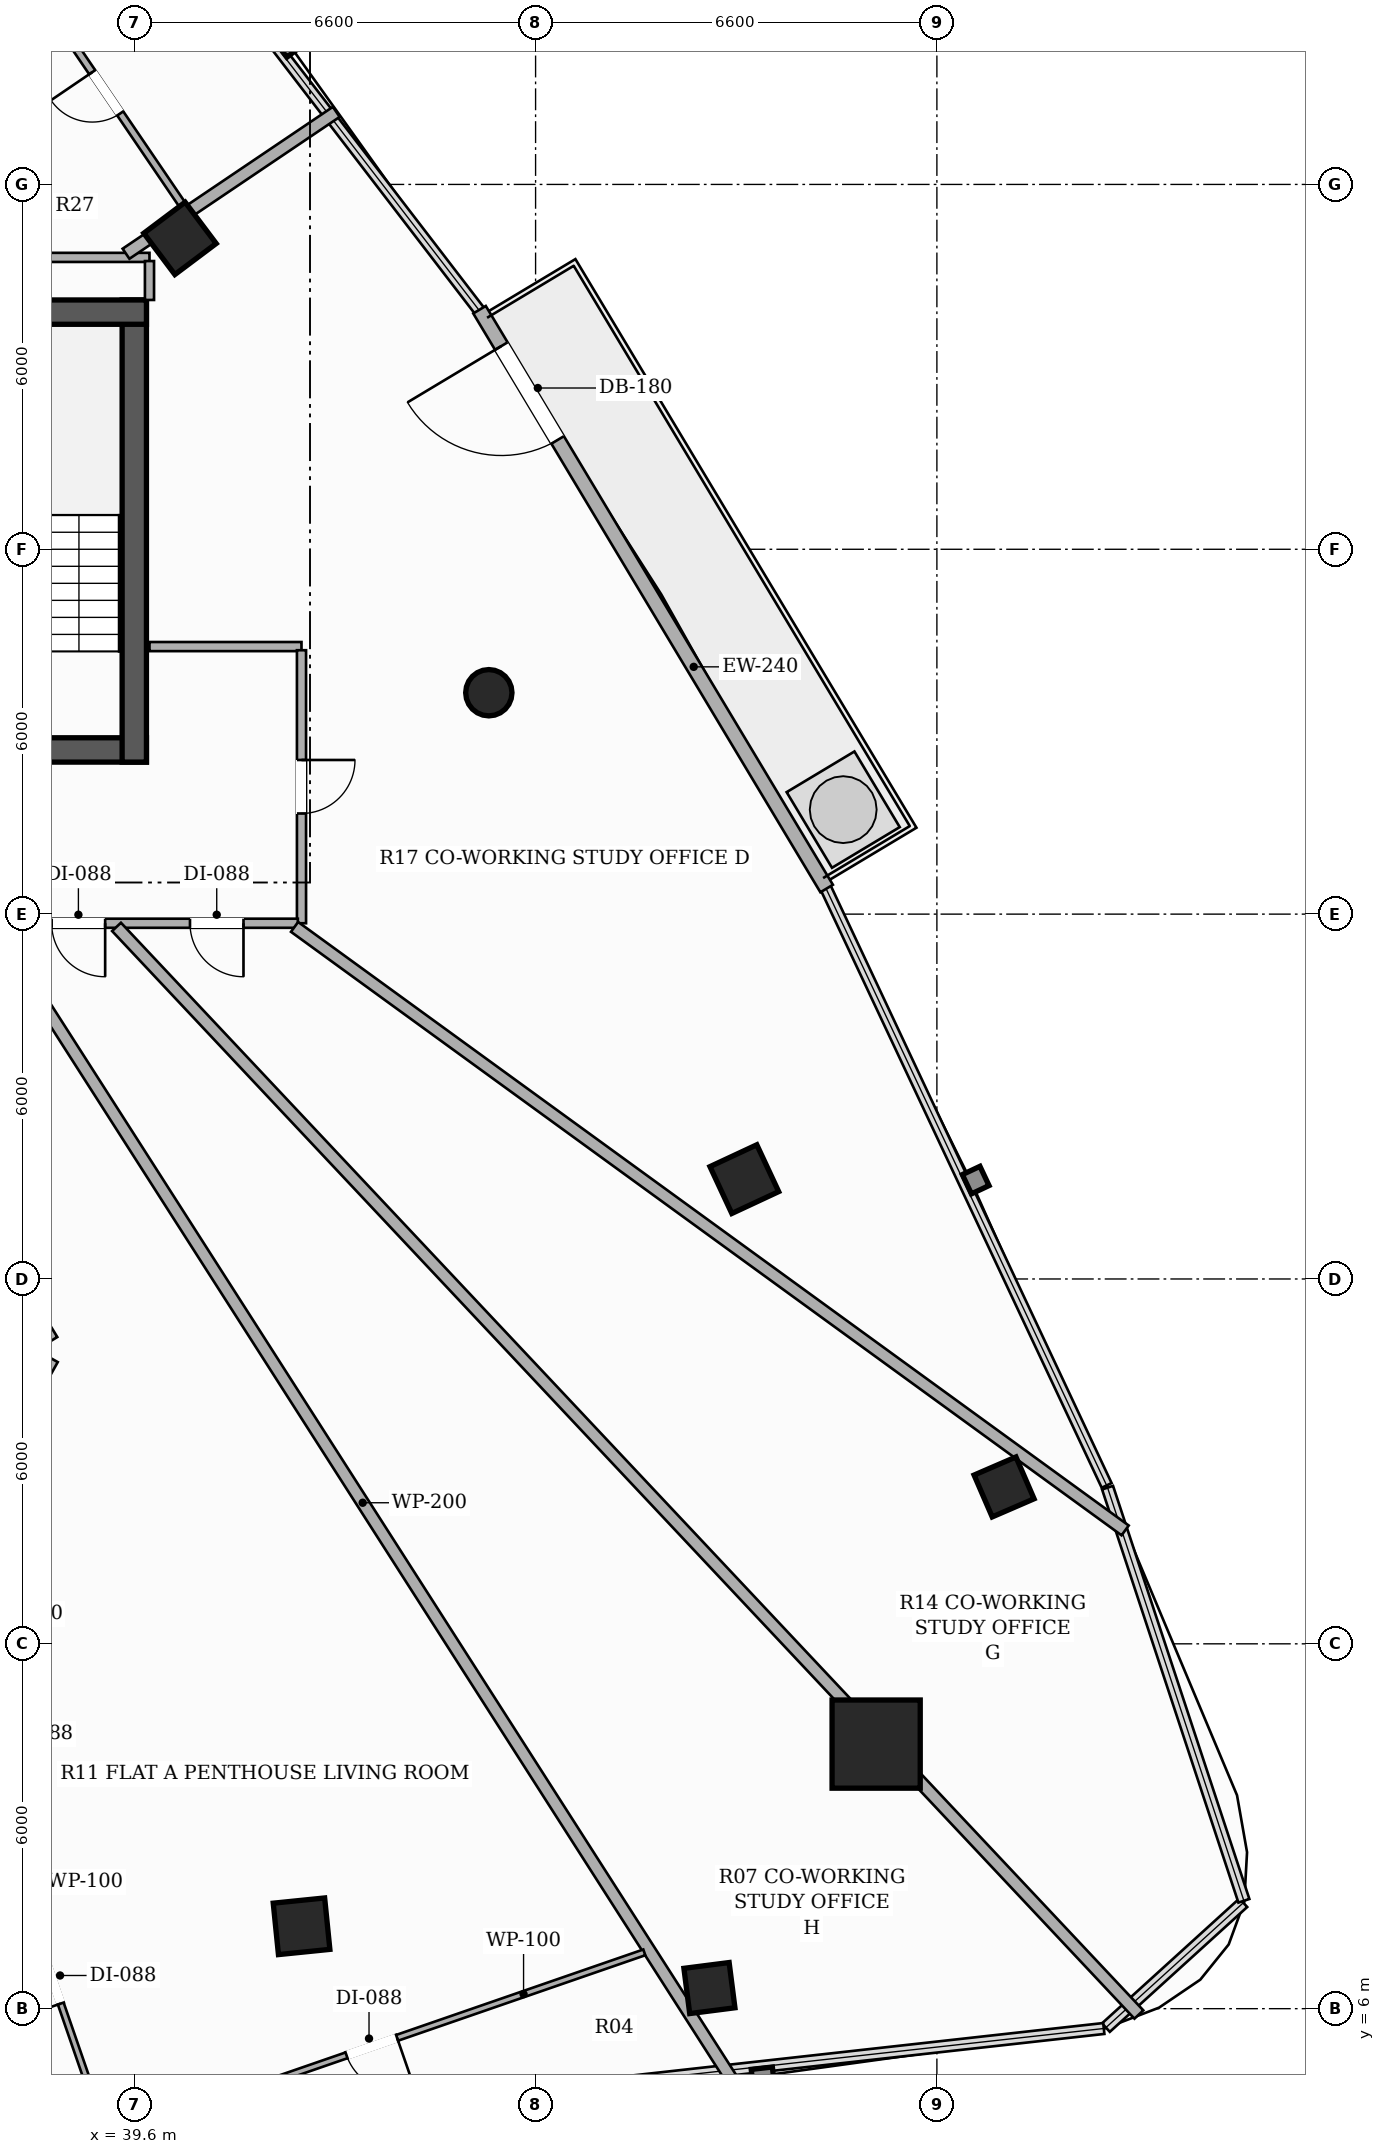
"""IFC4 building model, lengths in metres.
Left out: names, types, materials, properties, quantities, classifications, styles, units other than length and angle.
Written with IfcOpenShell. Run it as: python <this file> out.ifc"""

import sys

from ifc_helpers import new_model, si_unit, direction, frame, frame_2d, origin, origin_2d, place, context, subcontext, project, spatial, rectangle, hollow_rectangle, hollow_circle, extrude, element, fill, save


model = new_model("IFC4")
c1 = context("Model", 3, precision=1e-05, world=origin(), true_north=direction((0.0, 1.0)))
c2 = subcontext(c1, "Body", "Model", "MODEL_VIEW")
j1 = project(units=[si_unit("LENGTHUNIT", "METRE"), si_unit("PLANEANGLEUNIT", "RADIAN")], contexts=[c1])
p1 = place(None, origin())
s1 = spatial("IfcSite", under=j1, at=p1, CompositionType="ELEMENT")
p2 = place(p1, origin())
s2 = spatial("IfcBuilding", under=s1, at=p2, CompositionType="ELEMENT")
p3 = place(p2, frame((0.0, 0.0, 160.55)))
s3 = spatial("IfcBuildingStorey", under=s2, at=p3, CompositionType="ELEMENT", Elevation=160.55)
p4 = place(p3, frame((26.2, 26.7, 0.0), z_axis=(0.0, 0.0, 1.0), x_axis=(1.0, 0.0, 0.0)))
e1 = element("IfcWall", 1, at=p4, inside=s3, PredefinedType="SHEAR", context=c2, shape_type="SweptSolid", body=[
    extrude(rectangle(XDim=13.6, YDim=0.4, at=frame_2d((6.8, 0.0))), origin(), (0.0, 0.0, 1.0), 3.3),
])
p5 = place(p4, frame((4.35, 0.0, 0.0)))
e2 = element("IfcOpeningElement", 2, at=p5, cuts=e1, PredefinedType="OPENING", context=c2, shape_type="SweptSolid", body=[
    extrude(rectangle(XDim=1.05, YDim=2.15, at=frame_2d((0.525, 1.075))), frame((0.0, 0.21, 0.0), z_axis=(0.0, -1.0, 0.0), x_axis=(1.0, 0.0, 0.0)), (0.0, 0.0, 1.0), 0.42),
])
p6 = place(p4, frame((8.3, 0.0, 0.0)))
e3 = element("IfcOpeningElement", 3, at=p6, cuts=e1, PredefinedType="OPENING", context=c2, shape_type="SweptSolid", body=[
    extrude(rectangle(XDim=1.05, YDim=2.15, at=frame_2d((0.525, 1.075))), frame((0.0, 0.21, 0.0), z_axis=(0.0, -1.0, 0.0), x_axis=(1.0, 0.0, 0.0)), (0.0, 0.0, 1.0), 0.42),
])
p7 = place(p3, frame((39.6, 26.5, 0.0), z_axis=(0.0, 0.0, 1.0), x_axis=(0.0, 1.0, 0.0)))
e4 = element("IfcWall", 4, at=p7, inside=s3, PredefinedType="SHEAR", context=c2, shape_type="SweptSolid", body=[
    extrude(rectangle(XDim=7.6, YDim=0.4, at=frame_2d((3.8, 0.0))), origin(), (0.0, 0.0, 1.0), 3.3),
])
p8 = place(p3, frame((36.12, 33.9, 0.0), z_axis=(0.0, 0.0, 1.0), x_axis=(1.0, 0.0, 0.0)))
e5 = element("IfcWall", 5, at=p8, inside=s3, PredefinedType="SHEAR", context=c2, shape_type="SweptSolid", body=[
    extrude(rectangle(XDim=3.68, YDim=0.4, at=frame_2d((1.84, 0.0))), origin(), (0.0, 0.0, 1.0), 3.3),
])
p9 = place(p3, frame((51.801, 10.351, 0.0), z_axis=(0.0, 0.0, 1.0), x_axis=(1.0, 0.0, 0.0)))
e6 = element("IfcColumn", 6, at=p9, inside=s3, PredefinedType="COLUMN", context=c2, shape_type="SweptSolid", body=[
    extrude(hollow_rectangle(XDim=1.45, YDim=1.45, WallThickness=0.045, at=origin_2d()), origin(), (0.0, 0.0, 1.0), 3.3),
])
for number, where, z_axis, x_axis in (
    (7, (42.351, 7.355, 0.0), (0.0, 0.0, 1.0), (0.995, 0.101, 0.0)),
    (8, (49.633, 19.642, 0.0), (0.0, 0.0, 1.0), (-0.423, 0.906, 0.0)),
):
    element("IfcColumn", number, at=place(p3, frame(where, z_axis=z_axis, x_axis=x_axis)), inside=s3, PredefinedType="COLUMN", context=c2, shape_type="SweptSolid", body=[
        extrude(hollow_rectangle(XDim=0.85, YDim=0.85, WallThickness=0.028, at=origin_2d()), origin(), (0.0, 0.0, 1.0), 3.3),
    ])
p10 = place(p3, frame((45.431, 27.641, 0.0), z_axis=(0.0, 0.0, 1.0), x_axis=(1.0, 0.0, 0.0)))
e9 = element("IfcColumn", 9, at=p10, inside=s3, PredefinedType="COLUMN", context=c2, shape_type="SweptSolid", body=[
    extrude(hollow_circle(Radius=0.381, WallThickness=0.022, at=origin_2d()), origin(), (0.0, 0.0, 1.0), 3.3),
])
p11 = place(p3, frame((40.352, 35.113, 0.0), z_axis=(0.0, 0.0, 1.0), x_axis=(-0.600420225326, 0.799684658487, 0.0)))
e10 = element("IfcColumn", 10, at=p11, inside=s3, PredefinedType="COLUMN", context=c2, shape_type="SweptSolid", body=[
    extrude(hollow_rectangle(XDim=0.85, YDim=0.85, WallThickness=0.028, at=origin_2d()), origin(), (0.0, 0.0, 1.0), 3.3),
])
for number, where, z_axis, x_axis in (
    (11, (49.059, 6.339, 0.0), (0.0, 0.0, 1.0), (0.992, 0.127, 0.0)),
    (12, (53.905, 14.58, 0.0), (0.0, 0.0, 1.0), (-0.397, 0.918, 0.0)),
):
    element("IfcColumn", number, at=place(p3, frame(where, z_axis=z_axis, x_axis=x_axis)), inside=s3, PredefinedType="COLUMN", context=c2, shape_type="SweptSolid", body=[
        extrude(hollow_rectangle(XDim=0.75, YDim=0.75, WallThickness=0.025, at=origin_2d()), origin(), (0.0, 0.0, 1.0), 3.3),
    ])
p12 = place(p3, frame((50.987, 24.421, 0.0), z_axis=(0.0, 0.0, 1.0), x_axis=(-0.514334017412, 0.85758994778, 0.0)))
e13 = element("IfcWall", 13, at=p12, inside=s3, PredefinedType="SOLIDWALL", context=c2, shape_type="SweptSolid", body=[
    extrude(rectangle(XDim=11.1, YDim=0.24, at=frame_2d((5.55, 0.0))), origin(), (0.0, 0.0, 1.0), 2.624),
])
p13 = place(p12, frame((8.602, 0.0, 0.0)))
e14 = element("IfcOpeningElement", 14, at=p13, cuts=e13, PredefinedType="OPENING", context=c2, shape_type="SweptSolid", body=[
    extrude(rectangle(XDim=1.8, YDim=2.2, at=frame_2d((0.9, 1.1))), frame((0.0, 0.13, 0.0), z_axis=(0.0, -1.0, 0.0), x_axis=(1.0, 0.0, 0.0)), (0.0, 0.0, 1.0), 0.26),
])
p14 = place(p3, frame((39.85, 28.4, 0.0), z_axis=(0.0, 0.0, 1.0), x_axis=(1.0, 0.0, 0.0)))
e15 = element("IfcWall", 15, at=p14, inside=s3, PredefinedType="PARTITIONING", context=c2, shape_type="SweptSolid", body=[
    extrude(rectangle(XDim=2.5, YDim=0.15, at=frame_2d((1.25, 0.0))), origin(), (0.0, 0.0, 1.0), 2.721),
])
p15 = place(p3, frame((42.35, 28.34, 0.0), z_axis=(0.0, 0.0, 1.0), x_axis=(0.0, -1.0, 0.0)))
e16 = element("IfcWall", 16, at=p15, inside=s3, PredefinedType="PARTITIONING", context=c2, shape_type="SweptSolid", body=[
    extrude(rectangle(XDim=4.49, YDim=0.15, at=frame_2d((2.245, 0.0))), origin(), (0.0, 0.0, 1.0), 2.721),
])
p16 = place(p15, frame((1.805, 0.0, 0.0)))
e17 = element("IfcOpeningElement", 17, at=p16, cuts=e16, PredefinedType="OPENING", context=c2, shape_type="SweptSolid", body=[
    extrude(rectangle(XDim=0.88, YDim=2.1, at=frame_2d((0.44, 1.05))), frame((0.0, 0.085, 0.0), z_axis=(0.0, -1.0, 0.0), x_axis=(1.0, 0.0, 0.0)), (0.0, 0.0, 1.0), 0.17),
])
p17 = place(p3, frame((42.29, 23.85, 0.0), z_axis=(0.0, 0.0, 1.0), x_axis=(-1.0, 0.0, 0.0)))
e18 = element("IfcWall", 18, at=p17, inside=s3, PredefinedType="PARTITIONING", context=c2, shape_type="SweptSolid", body=[
    extrude(rectangle(XDim=8.202, YDim=0.15, at=frame_2d((4.101, 0.0))), origin(), (0.0, 0.0, 1.0), 2.492),
])
p18 = place(p17, frame((5.987, 0.0, 0.0)))
e19 = element("IfcOpeningElement", 19, at=p18, cuts=e18, PredefinedType="OPENING", context=c2, shape_type="SweptSolid", body=[
    extrude(rectangle(XDim=0.92, YDim=2.15, at=frame_2d((0.46, 1.075))), frame((0.0, 0.085, 0.0), z_axis=(0.0, -1.0, 0.0), x_axis=(1.0, 0.0, 0.0)), (0.0, 0.0, 1.0), 0.17),
])
p19 = place(p17, frame((0.894, 0.0, 0.0)))
e20 = element("IfcOpeningElement", 20, at=p19, cuts=e18, PredefinedType="OPENING", context=c2, shape_type="SweptSolid", body=[
    extrude(rectangle(XDim=0.88, YDim=2.1, at=frame_2d((0.44, 1.05))), frame((0.0, 0.085, 0.0), z_axis=(0.0, -1.0, 0.0), x_axis=(1.0, 0.0, 0.0)), (0.0, 0.0, 1.0), 0.17),
])
p20 = place(p17, frame((3.169, 0.0, 0.0)))
e21 = element("IfcOpeningElement", 21, at=p20, cuts=e18, PredefinedType="OPENING", context=c2, shape_type="SweptSolid", body=[
    extrude(rectangle(XDim=0.88, YDim=2.1, at=frame_2d((0.44, 1.05))), frame((0.0, 0.085, 0.0), z_axis=(0.0, -1.0, 0.0), x_axis=(1.0, 0.0, 0.0)), (0.0, 0.0, 1.0), 0.17),
])
p21 = place(p3, frame((37.91, 34.8, 0.0), z_axis=(0.0, 0.0, 1.0), x_axis=(1.0, 0.0, 0.0)))
e22 = element("IfcWall", 22, at=p21, inside=s3, PredefinedType="PARTITIONING", context=c2, shape_type="SweptSolid", body=[
    extrude(rectangle(XDim=1.94, YDim=0.15, at=frame_2d((0.97, 0.0))), origin(), (0.0, 0.0, 1.0), 2.721),
])
p22 = place(p3, frame((39.85, 34.74, 0.0), z_axis=(0.0, 0.0, 1.0), x_axis=(0.0, -1.0, 0.0)))
e23 = element("IfcWall", 23, at=p22, inside=s3, PredefinedType="PARTITIONING", context=c2, shape_type="SweptSolid", body=[
    extrude(rectangle(XDim=0.64, YDim=0.15, at=frame_2d((0.32, 0.0))), origin(), (0.0, 0.0, 1.0), 2.721),
])
p23 = place(p3, frame((34.119, 23.79, 0.0), z_axis=(0.0, 0.0, 1.0), x_axis=(0.521942869651, -0.852980445744, 0.0)))
e24 = element("IfcWall", 24, at=p23, inside=s3, PredefinedType="PARTITIONING", context=c2, shape_type="SweptSolid", body=[
    extrude(rectangle(XDim=7.953, YDim=0.15, at=frame_2d((3.977, 0.0))), origin(), (0.0, 0.0, 1.0), 2.721),
])
p24 = place(p3, frame((38.276, 16.67, 0.0), z_axis=(0.0, 0.0, 1.0), x_axis=(-0.489067077696, -0.872246177127, 0.0)))
e25 = element("IfcWall", 25, at=p24, inside=s3, PredefinedType="PARTITIONING", context=c2, shape_type="SweptSolid", body=[
    extrude(rectangle(XDim=1.01, YDim=0.15, at=frame_2d((0.505, 0.0))), origin(), (0.0, 0.0, 1.0), 3.06),
])
p25 = place(p3, frame((37.295, 23.79, 0.0), z_axis=(0.0, 0.0, 1.0), x_axis=(0.539100523601, -0.842241429433, 0.0)))
e26 = element("IfcWall", 26, at=p25, inside=s3, PredefinedType="PARTITIONING", context=c2, shape_type="SweptSolid", body=[
    extrude(rectangle(XDim=22.488, YDim=0.2, at=frame_2d((11.244, 0.0))), origin(), (0.0, 0.0, 1.0), 2.413),
])
p26 = place(p3, frame((39.464, 34.86, 0.0), z_axis=(0.0, 0.0, 1.0), x_axis=(0.828976210701, 0.559283865395, 0.0)))
e27 = element("IfcWall", 27, at=p26, inside=s3, PredefinedType="PARTITIONING", context=c2, shape_type="SweptSolid", body=[
    extrude(rectangle(XDim=4.171, YDim=0.2, at=frame_2d((2.086, 0.0))), origin(), (0.0, 0.0, 1.0), 2.413),
])
p27 = place(p3, frame((55.896, 13.865, 0.0), z_axis=(0.0, 0.0, 1.0), x_axis=(-0.809001736781, 0.587806251995, 0.0)))
e28 = element("IfcWall", 28, at=p27, inside=s3, PredefinedType="PARTITIONING", context=c2, shape_type="SweptSolid", body=[
    extrude(rectangle(XDim=16.885, YDim=0.2, at=frame_2d((8.442, 0.0))), origin(), (0.0, 0.0, 1.0), 2.413),
])
p28 = place(p3, frame((56.122, 5.904, 0.0), z_axis=(0.0, 0.0, 1.0), x_axis=(-0.684934612975, 0.728604540165, 0.0)))
e29 = element("IfcWall", 29, at=p28, inside=s3, PredefinedType="PARTITIONING", context=c2, shape_type="SweptSolid", body=[
    extrude(rectangle(XDim=24.548, YDim=0.2, at=frame_2d((12.274, 0.0))), origin(), (0.0, 0.0, 1.0), 2.413),
])
p29 = place(p3, frame((39.164, 3.848, 0.0), z_axis=(0.0, 0.0, 1.0), x_axis=(-0.326778856457, 0.945100830056, 0.0)))
e30 = element("IfcWall", 30, at=p29, inside=s3, PredefinedType="PARTITIONING", context=c2, shape_type="SweptSolid", body=[
    extrude(rectangle(XDim=5.612, YDim=0.1, at=frame_2d((2.806, 0.0))), origin(), (0.0, 0.0, 1.0), 2.413),
])
p30 = place(p29, frame((2.366, 0.0, 0.0)))
e31 = element("IfcOpeningElement", 31, at=p30, cuts=e30, PredefinedType="OPENING", context=c2, shape_type="SweptSolid", body=[
    extrude(rectangle(XDim=0.88, YDim=2.1, at=frame_2d((0.44, 1.05))), frame((0.0, 0.06, 0.0), z_axis=(0.0, -1.0, 0.0), x_axis=(1.0, 0.0, 0.0)), (0.0, 0.0, 1.0), 0.12),
])
p31 = place(p3, frame((47.988, 6.926, 0.0), z_axis=(0.0, 0.0, 1.0), x_axis=(-0.945100175753, -0.326780748809, 0.0)))
e32 = element("IfcWall", 32, at=p31, inside=s3, PredefinedType="PARTITIONING", context=c2, shape_type="SweptSolid", body=[
    extrude(rectangle(XDim=9.484, YDim=0.1, at=frame_2d((4.742, 0.0))), origin(), (0.0, 0.0, 1.0), 2.413),
])
p32 = place(p31, frame((4.302, 0.0, 0.0)))
e33 = element("IfcOpeningElement", 33, at=p32, cuts=e32, PredefinedType="OPENING", context=c2, shape_type="SweptSolid", body=[
    extrude(rectangle(XDim=0.88, YDim=2.1, at=frame_2d((0.44, 1.05))), frame((0.0, 0.06, 0.0), z_axis=(0.0, -1.0, 0.0), x_axis=(1.0, 0.0, 0.0)), (0.0, 0.0, 1.0), 0.12),
])
p33 = place(p3, frame((40.427, 35.612, 0.0), z_axis=(0.0, 0.0, 1.0), x_axis=(-0.562385802303, 0.826874965982, 0.0)))
e34 = element("IfcWall", 34, at=p33, inside=s3, PredefinedType="PARTITIONING", context=c2, shape_type="SweptSolid", body=[
    extrude(rectangle(XDim=4.582, YDim=0.12, at=frame_2d((2.291, 0.0))), origin(), (0.0, 0.0, 1.0), 2.413),
])
p34 = place(p33, frame((1.881, 0.0, 0.0)))
e35 = element("IfcOpeningElement", 35, at=p34, cuts=e34, PredefinedType="OPENING", context=c2, shape_type="SweptSolid", body=[
    extrude(rectangle(XDim=0.82, YDim=2.1, at=frame_2d((0.41, 1.05))), frame((0.0, 0.07, 0.0), z_axis=(0.0, -1.0, 0.0), x_axis=(1.0, 0.0, 0.0)), (0.0, 0.0, 1.0), 0.14),
])
p35 = place(p13, origin())
e36 = element("IfcDoor", 36, at=p35, inside=s3, OperationType="SINGLE_SWING_RIGHT", PredefinedType="DOOR", context=c2, shape_type="SweptSolid", body=[
    extrude(rectangle(XDim=1.8, YDim=2.2, at=frame_2d((0.9, 1.1))), frame((0.0, 0.025, 0.0), z_axis=(0.0, -1.0, 0.0), x_axis=(1.0, 0.0, 0.0)), (0.0, 0.0, 1.0), 0.05),
])
fill(e14, e36)
p36 = place(p30, origin())
e37 = element("IfcDoor", 37, at=p36, inside=s3, OperationType="SINGLE_SWING_LEFT", PredefinedType="DOOR", context=c2, shape_type="SweptSolid", body=[
    extrude(rectangle(XDim=0.88, YDim=2.1, at=frame_2d((0.44, 1.05))), frame((0.0, 0.025, 0.0), z_axis=(0.0, -1.0, 0.0), x_axis=(1.0, 0.0, 0.0)), (0.0, 0.0, 1.0), 0.05),
])
fill(e31, e37)
p37 = place(p32, origin())
e38 = element("IfcDoor", 38, at=p37, inside=s3, OperationType="SINGLE_SWING_LEFT", PredefinedType="DOOR", context=c2, shape_type="SweptSolid", body=[
    extrude(rectangle(XDim=0.88, YDim=2.1, at=frame_2d((0.44, 1.05))), frame((0.0, 0.025, 0.0), z_axis=(0.0, -1.0, 0.0), x_axis=(1.0, 0.0, 0.0)), (0.0, 0.0, 1.0), 0.05),
])
fill(e33, e38)
p38 = place(p16, origin())
e39 = element("IfcDoor", 39, at=p38, inside=s3, OperationType="SINGLE_SWING_LEFT", PredefinedType="DOOR", context=c2, shape_type="SweptSolid", body=[
    extrude(rectangle(XDim=0.88, YDim=2.1, at=frame_2d((0.44, 1.05))), frame((0.0, 0.025, 0.0), z_axis=(0.0, -1.0, 0.0), x_axis=(1.0, 0.0, 0.0)), (0.0, 0.0, 1.0), 0.05),
])
fill(e17, e39)
p39 = place(p34, origin())
e40 = element("IfcDoor", 40, at=p39, inside=s3, OperationType="SINGLE_SWING_RIGHT", PredefinedType="DOOR", context=c2, shape_type="SweptSolid", body=[
    extrude(rectangle(XDim=0.82, YDim=2.1, at=frame_2d((0.41, 1.05))), frame((0.0, 0.025, 0.0), z_axis=(0.0, -1.0, 0.0), x_axis=(1.0, 0.0, 0.0)), (0.0, 0.0, 1.0), 0.05),
])
fill(e35, e40)
p40 = place(p19, origin())
e41 = element("IfcDoor", 41, at=p40, inside=s3, OperationType="SINGLE_SWING_LEFT", PredefinedType="DOOR", context=c2, shape_type="SweptSolid", body=[
    extrude(rectangle(XDim=0.88, YDim=2.1, at=frame_2d((0.44, 1.05))), frame((0.0, 0.025, 0.0), z_axis=(0.0, -1.0, 0.0), x_axis=(1.0, 0.0, 0.0)), (0.0, 0.0, 1.0), 0.05),
])
fill(e20, e41)
p41 = place(p20, origin())
e42 = element("IfcDoor", 42, at=p41, inside=s3, OperationType="SINGLE_SWING_LEFT", PredefinedType="DOOR", context=c2, shape_type="SweptSolid", body=[
    extrude(rectangle(XDim=0.88, YDim=2.1, at=frame_2d((0.44, 1.05))), frame((0.0, 0.025, 0.0), z_axis=(0.0, -1.0, 0.0), x_axis=(1.0, 0.0, 0.0)), (0.0, 0.0, 1.0), 0.05),
])
fill(e21, e42)
save(model, sys.argv[1])
